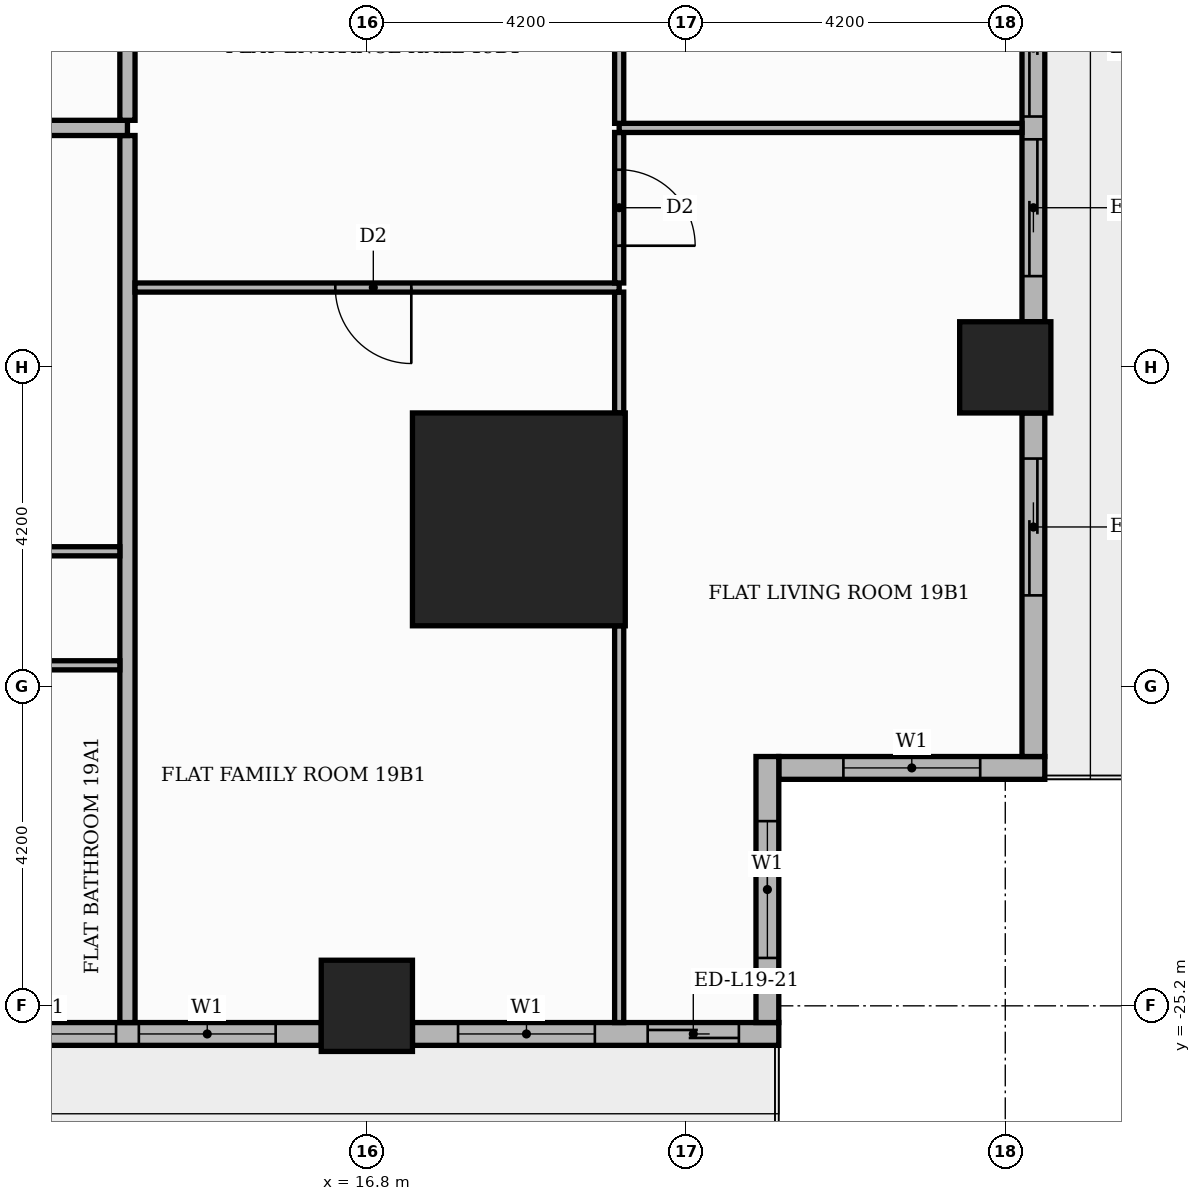
"""IFC4 building model, lengths in metres.
Left out: names, types, materials, properties, quantities, classifications, styles, units other than length and angle.
Written with IfcOpenShell. Run it as: python <this file> out.ifc"""

import sys

from ifc_helpers import new_model, si_unit, direction, frame, frame_2d, origin, origin_2d, place, context, subcontext, project, spatial, rectangle, extrude, element, fill, save


model = new_model("IFC4")
c1 = context("Model", 3, precision=1e-05, world=origin(), true_north=direction((0.0, 1.0)))
c2 = subcontext(c1, "Body", "Model", "MODEL_VIEW")
j1 = project(units=[si_unit("LENGTHUNIT", "METRE"), si_unit("PLANEANGLEUNIT", "RADIAN")], contexts=[c1])
p1 = place(None, origin())
s1 = spatial("IfcSite", under=j1, at=p1, CompositionType="ELEMENT")
p2 = place(p1, origin())
s2 = spatial("IfcBuilding", under=s1, at=p2, CompositionType="ELEMENT")
p3 = place(p2, frame((0.0, 0.0, 83.1)))
s3 = spatial("IfcBuildingStorey", under=s2, at=p3, CompositionType="ELEMENT", Elevation=83.1)
p4 = place(p3, frame((18.8, -18.8, 0.0), z_axis=(0.0, 0.0, 1.0), x_axis=(1.0, 0.0, 0.0)))
e1 = element("IfcColumn", 1, at=p4, inside=s3, PredefinedType="COLUMN", context=c2, shape_type="SweptSolid", body=[
    extrude(rectangle(XDim=2.8, YDim=2.8, at=origin_2d()), origin(), (0.0, 0.0, 1.0), 3.9),
])
for number, where, z_axis, x_axis in (
    (2, (25.2, -16.8, 0.0), (0.0, 0.0, 1.0), (1.0, 0.0, 0.0)),
    (3, (16.8, -25.2, 0.0), (0.0, 0.0, 1.0), (1.0, 0.0, 0.0)),
):
    element("IfcColumn", number, at=place(p3, frame(where, z_axis=z_axis, x_axis=x_axis)), inside=s3, PredefinedType="COLUMN", context=c2, shape_type="SweptSolid", body=[
        extrude(rectangle(XDim=1.2, YDim=1.2, at=origin_2d()), origin(), (0.0, 0.0, 1.0), 3.9),
    ])
p5 = place(p3, frame((22.22, -22.07, 0.0), z_axis=(0.0, 0.0, 1.0), x_axis=(1.0, 0.0, 0.0)))
e4 = element("IfcWall", 4, at=p5, inside=s3, PredefinedType="STANDARD", context=c2, shape_type="SweptSolid", body=[
    extrude(rectangle(XDim=3.5, YDim=0.3, at=frame_2d((1.75, 0.0))), origin(), (0.0, 0.0, 1.0), 3.48),
])
p6 = place(p5, frame((0.85, 0.0, 0.9)))
e5 = element("IfcOpeningElement", 5, at=p6, cuts=e4, PredefinedType="OPENING", context=c2, shape_type="SweptSolid", body=[
    extrude(rectangle(XDim=1.8, YDim=2.1, at=frame_2d((0.9, 1.05))), frame((0.0, 0.16, 0.0), z_axis=(0.0, -1.0, 0.0), x_axis=(1.0, 0.0, 0.0)), (0.0, 0.0, 1.0), 0.32),
])
p7 = place(p3, frame((25.57, -21.92, 0.0), z_axis=(0.0, 0.0, 1.0), x_axis=(0.0, 1.0, 0.0)))
e6 = element("IfcWall", 6, at=p7, inside=s3, PredefinedType="STANDARD", context=c2, shape_type="SweptSolid", body=[
    extrude(rectangle(XDim=4.52, YDim=0.3, at=frame_2d((2.26, 0.0))), origin(), (0.0, 0.0, 1.0), 3.48),
])
p8 = place(p7, frame((2.12, 0.0, 0.0)))
e7 = element("IfcOpeningElement", 7, at=p8, cuts=e6, PredefinedType="OPENING", context=c2, shape_type="SweptSolid", body=[
    extrude(rectangle(XDim=1.8, YDim=2.4, at=frame_2d((0.9, 1.2))), frame((0.0, 0.16, 0.0), z_axis=(0.0, -1.0, 0.0), x_axis=(1.0, 0.0, 0.0)), (0.0, 0.0, 1.0), 0.32),
])
p9 = place(p3, frame((25.57, -16.2, 0.0), z_axis=(0.0, 0.0, 1.0), x_axis=(0.0, 1.0, 0.0)))
e8 = element("IfcWall", 8, at=p9, inside=s3, PredefinedType="STANDARD", context=c2, shape_type="SweptSolid", body=[
    extrude(rectangle(XDim=7.2, YDim=0.3, at=frame_2d((3.6, 0.0))), origin(), (0.0, 0.0, 1.0), 3.48),
])
p10 = place(p9, frame((0.6, 0.0, 0.0)))
e9 = element("IfcOpeningElement", 9, at=p10, cuts=e8, PredefinedType="OPENING", context=c2, shape_type="SweptSolid", body=[
    extrude(rectangle(XDim=1.8, YDim=2.4, at=frame_2d((0.9, 1.2))), frame((0.0, 0.16, 0.0), z_axis=(0.0, -1.0, 0.0), x_axis=(1.0, 0.0, 0.0)), (0.0, 0.0, 1.0), 0.32),
])
p11 = place(p9, frame((2.7, 0.0, 0.0)))
e10 = element("IfcOpeningElement", 10, at=p11, cuts=e8, PredefinedType="OPENING", context=c2, shape_type="SweptSolid", body=[
    extrude(rectangle(XDim=1.8, YDim=2.4, at=frame_2d((0.9, 1.2))), frame((0.0, 0.16, 0.0), z_axis=(0.0, -1.0, 0.0), x_axis=(1.0, 0.0, 0.0)), (0.0, 0.0, 1.0), 0.32),
])
p12 = place(p9, frame((4.8, 0.0, 0.9)))
e11 = element("IfcOpeningElement", 11, at=p12, cuts=e8, PredefinedType="OPENING", context=c2, shape_type="SweptSolid", body=[
    extrude(rectangle(XDim=1.8, YDim=2.1, at=frame_2d((0.9, 1.05))), frame((0.0, 0.16, 0.0), z_axis=(0.0, -1.0, 0.0), x_axis=(1.0, 0.0, 0.0)), (0.0, 0.0, 1.0), 0.32),
])
p13 = place(p3, frame((9.0, -25.57, 0.0), z_axis=(0.0, 0.0, 1.0), x_axis=(1.0, 0.0, 0.0)))
e12 = element("IfcWall", 12, at=p13, inside=s3, PredefinedType="STANDARD", context=c2, shape_type="SweptSolid", body=[
    extrude(rectangle(XDim=7.2, YDim=0.3, at=frame_2d((3.6, 0.0))), origin(), (0.0, 0.0, 1.0), 3.48),
])
p14 = place(p13, frame((0.6, 0.0, 0.9)))
e13 = element("IfcOpeningElement", 13, at=p14, cuts=e12, PredefinedType="OPENING", context=c2, shape_type="SweptSolid", body=[
    extrude(rectangle(XDim=1.8, YDim=2.1, at=frame_2d((0.9, 1.05))), frame((0.0, 0.16, 0.0), z_axis=(0.0, -1.0, 0.0), x_axis=(1.0, 0.0, 0.0)), (0.0, 0.0, 1.0), 0.32),
])
p15 = place(p13, frame((2.7, 0.0, 0.9)))
e14 = element("IfcOpeningElement", 14, at=p15, cuts=e12, PredefinedType="OPENING", context=c2, shape_type="SweptSolid", body=[
    extrude(rectangle(XDim=1.8, YDim=2.1, at=frame_2d((0.9, 1.05))), frame((0.0, 0.16, 0.0), z_axis=(0.0, -1.0, 0.0), x_axis=(1.0, 0.0, 0.0)), (0.0, 0.0, 1.0), 0.32),
])
p16 = place(p13, frame((4.8, 0.0, 0.9)))
e15 = element("IfcOpeningElement", 15, at=p16, cuts=e12, PredefinedType="OPENING", context=c2, shape_type="SweptSolid", body=[
    extrude(rectangle(XDim=1.8, YDim=2.1, at=frame_2d((0.9, 1.05))), frame((0.0, 0.16, 0.0), z_axis=(0.0, -1.0, 0.0), x_axis=(1.0, 0.0, 0.0)), (0.0, 0.0, 1.0), 0.32),
])
p17 = place(p3, frame((17.4, -25.57, 0.0), z_axis=(0.0, 0.0, 1.0), x_axis=(1.0, 0.0, 0.0)))
e16 = element("IfcWall", 16, at=p17, inside=s3, PredefinedType="STANDARD", context=c2, shape_type="SweptSolid", body=[
    extrude(rectangle(XDim=4.82, YDim=0.3, at=frame_2d((2.41, 0.0))), origin(), (0.0, 0.0, 1.0), 3.48),
])
p18 = place(p17, frame((0.6, 0.0, 0.9)))
e17 = element("IfcOpeningElement", 17, at=p18, cuts=e16, PredefinedType="OPENING", context=c2, shape_type="SweptSolid", body=[
    extrude(rectangle(XDim=1.8, YDim=2.1, at=frame_2d((0.9, 1.05))), frame((0.0, 0.16, 0.0), z_axis=(0.0, -1.0, 0.0), x_axis=(1.0, 0.0, 0.0)), (0.0, 0.0, 1.0), 0.32),
])
p19 = place(p17, frame((3.095, 0.0, 0.0)))
e18 = element("IfcOpeningElement", 18, at=p19, cuts=e16, PredefinedType="OPENING", context=c2, shape_type="SweptSolid", body=[
    extrude(rectangle(XDim=1.2, YDim=2.4, at=frame_2d((0.6, 1.2))), frame((0.0, 0.16, 0.0), z_axis=(0.0, -1.0, 0.0), x_axis=(1.0, 0.0, 0.0)), (0.0, 0.0, 1.0), 0.32),
])
p20 = place(p3, frame((22.07, -25.42, 0.0), z_axis=(0.0, 0.0, 1.0), x_axis=(0.0, 1.0, 0.0)))
e19 = element("IfcWall", 19, at=p20, inside=s3, PredefinedType="STANDARD", context=c2, shape_type="SweptSolid", body=[
    extrude(rectangle(XDim=3.5, YDim=0.3, at=frame_2d((1.75, 0.0))), origin(), (0.0, 0.0, 1.0), 3.48),
])
p21 = place(p20, frame((0.85, 0.0, 0.9)))
e20 = element("IfcOpeningElement", 20, at=p21, cuts=e19, PredefinedType="OPENING", context=c2, shape_type="SweptSolid", body=[
    extrude(rectangle(XDim=1.8, YDim=2.1, at=frame_2d((0.9, 1.05))), frame((0.0, 0.16, 0.0), z_axis=(0.0, -1.0, 0.0), x_axis=(1.0, 0.0, 0.0)), (0.0, 0.0, 1.0), 0.32),
])
p22 = place(p3, frame((13.65, -25.42, 0.0), z_axis=(0.0, 0.0, 1.0), x_axis=(0.0, 1.0, 0.0)))
e21 = element("IfcWall", 21, at=p22, inside=s3, PredefinedType="PARTITIONING", context=c2, shape_type="SweptSolid", body=[
    extrude(rectangle(XDim=11.67, YDim=0.2, at=frame_2d((5.835, 0.0))), origin(), (0.0, 0.0, 1.0), 3.48),
])
p23 = place(p3, frame((20.12, -25.42, 0.0), z_axis=(0.0, 0.0, 1.0), x_axis=(0.0, 1.0, 0.0)))
e22 = element("IfcWall", 22, at=p23, inside=s3, PredefinedType="PARTITIONING", context=c2, shape_type="SweptSolid", body=[
    extrude(rectangle(XDim=5.22, YDim=0.12, at=frame_2d((2.61, 0.0))), origin(), (0.0, 0.0, 1.0), 3.48),
])
p24 = place(p3, frame((-25.42, -20.72, 0.0), z_axis=(0.0, 0.0, 1.0), x_axis=(1.0, 0.0, 0.0)))
e23 = element("IfcWall", 23, at=p24, inside=s3, PredefinedType="PARTITIONING", context=c2, shape_type="SweptSolid", body=[
    extrude(rectangle(XDim=38.97, YDim=0.12, at=frame_2d((19.485, 0.0))), origin(), (0.0, 0.0, 1.0), 3.48),
])
p25 = place(p24, frame((12.32, 0.0, 0.0)))
e24 = element("IfcOpeningElement", 24, at=p25, cuts=e23, PredefinedType="OPENING", context=c2, shape_type="SweptSolid", body=[
    extrude(rectangle(XDim=1.0, YDim=2.1, at=frame_2d((0.5, 1.05))), frame((0.0, 0.07, 0.0), z_axis=(0.0, -1.0, 0.0), x_axis=(1.0, 0.0, 0.0)), (0.0, 0.0, 1.0), 0.14),
])
p26 = place(p24, frame((15.52, 0.0, 0.0)))
e25 = element("IfcOpeningElement", 25, at=p26, cuts=e23, PredefinedType="OPENING", context=c2, shape_type="SweptSolid", body=[
    extrude(rectangle(XDim=0.9, YDim=2.1, at=frame_2d((0.45, 1.05))), frame((0.0, 0.07, 0.0), z_axis=(0.0, -1.0, 0.0), x_axis=(1.0, 0.0, 0.0)), (0.0, 0.0, 1.0), 0.14),
])
p27 = place(p24, frame((19.72, 0.0, 0.0)))
e26 = element("IfcOpeningElement", 26, at=p27, cuts=e23, PredefinedType="OPENING", context=c2, shape_type="SweptSolid", body=[
    extrude(rectangle(XDim=0.9, YDim=2.1, at=frame_2d((0.45, 1.05))), frame((0.0, 0.07, 0.0), z_axis=(0.0, -1.0, 0.0), x_axis=(1.0, 0.0, 0.0)), (0.0, 0.0, 1.0), 0.14),
])
p28 = place(p24, frame((28.12, 0.0, 0.0)))
e27 = element("IfcOpeningElement", 27, at=p28, cuts=e23, PredefinedType="OPENING", context=c2, shape_type="SweptSolid", body=[
    extrude(rectangle(XDim=0.9, YDim=2.1, at=frame_2d((0.45, 1.05))), frame((0.0, 0.07, 0.0), z_axis=(0.0, -1.0, 0.0), x_axis=(1.0, 0.0, 0.0)), (0.0, 0.0, 1.0), 0.14),
])
p29 = place(p24, frame((34.42, 0.0, 0.0)))
e28 = element("IfcOpeningElement", 28, at=p29, cuts=e23, PredefinedType="OPENING", context=c2, shape_type="SweptSolid", body=[
    extrude(rectangle(XDim=0.9, YDim=2.1, at=frame_2d((0.45, 1.05))), frame((0.0, 0.07, 0.0), z_axis=(0.0, -1.0, 0.0), x_axis=(1.0, 0.0, 0.0)), (0.0, 0.0, 1.0), 0.14),
])
p30 = place(p3, frame((-7.35, -19.22, 0.0), z_axis=(0.0, 0.0, 1.0), x_axis=(1.0, 0.0, 0.0)))
e29 = element("IfcWall", 29, at=p30, inside=s3, PredefinedType="PARTITIONING", context=c2, shape_type="SweptSolid", body=[
    extrude(rectangle(XDim=20.9, YDim=0.12, at=frame_2d((10.45, 0.0))), origin(), (0.0, 0.0, 1.0), 3.48),
])
p31 = place(p30, frame((2.7, 0.0, 0.0)))
e30 = element("IfcOpeningElement", 30, at=p31, cuts=e29, PredefinedType="OPENING", context=c2, shape_type="SweptSolid", body=[
    extrude(rectangle(XDim=0.9, YDim=2.1, at=frame_2d((0.45, 1.05))), frame((0.0, 0.07, 0.0), z_axis=(0.0, -1.0, 0.0), x_axis=(1.0, 0.0, 0.0)), (0.0, 0.0, 1.0), 0.14),
])
p32 = place(p30, frame((7.95, 0.0, 0.0)))
e31 = element("IfcOpeningElement", 31, at=p32, cuts=e29, PredefinedType="OPENING", context=c2, shape_type="SweptSolid", body=[
    extrude(rectangle(XDim=0.9, YDim=2.1, at=frame_2d((0.45, 1.05))), frame((0.0, 0.07, 0.0), z_axis=(0.0, -1.0, 0.0), x_axis=(1.0, 0.0, 0.0)), (0.0, 0.0, 1.0), 0.14),
])
p33 = place(p30, frame((11.175, 0.0, 0.0)))
e32 = element("IfcOpeningElement", 32, at=p33, cuts=e29, PredefinedType="OPENING", context=c2, shape_type="SweptSolid", body=[
    extrude(rectangle(XDim=0.9, YDim=2.1, at=frame_2d((0.45, 1.05))), frame((0.0, 0.07, 0.0), z_axis=(0.0, -1.0, 0.0), x_axis=(1.0, 0.0, 0.0)), (0.0, 0.0, 1.0), 0.14),
])
p34 = place(p30, frame((14.1, 0.0, 0.0)))
e33 = element("IfcOpeningElement", 33, at=p34, cuts=e29, PredefinedType="OPENING", context=c2, shape_type="SweptSolid", body=[
    extrude(rectangle(XDim=0.9, YDim=2.1, at=frame_2d((0.45, 1.05))), frame((0.0, 0.07, 0.0), z_axis=(0.0, -1.0, 0.0), x_axis=(1.0, 0.0, 0.0)), (0.0, 0.0, 1.0), 0.14),
])
p35 = place(p30, frame((18.225, 0.0, 0.0)))
e34 = element("IfcOpeningElement", 34, at=p35, cuts=e29, PredefinedType="OPENING", context=c2, shape_type="SweptSolid", body=[
    extrude(rectangle(XDim=0.9, YDim=2.1, at=frame_2d((0.45, 1.05))), frame((0.0, 0.07, 0.0), z_axis=(0.0, -1.0, 0.0), x_axis=(1.0, 0.0, 0.0)), (0.0, 0.0, 1.0), 0.14),
])
p36 = place(p3, frame((20.12, -17.4, 0.0), z_axis=(0.0, 0.0, 1.0), x_axis=(0.0, 1.0, 0.0)))
e35 = element("IfcWall", 35, at=p36, inside=s3, PredefinedType="PARTITIONING", context=c2, shape_type="SweptSolid", body=[
    extrude(rectangle(XDim=1.59, YDim=0.12, at=frame_2d((0.795, 0.0))), origin(), (0.0, 0.0, 1.0), 3.48),
])
p37 = place(p3, frame((13.75, -15.75, 0.0), z_axis=(0.0, 0.0, 1.0), x_axis=(1.0, 0.0, 0.0)))
e36 = element("IfcWall", 36, at=p37, inside=s3, PredefinedType="PARTITIONING", context=c2, shape_type="SweptSolid", body=[
    extrude(rectangle(XDim=6.37, YDim=0.12, at=frame_2d((3.185, 0.0))), origin(), (0.0, 0.0, 1.0), 3.48),
])
p38 = place(p37, frame((2.635, 0.0, 0.0)))
e37 = element("IfcOpeningElement", 37, at=p38, cuts=e36, PredefinedType="OPENING", context=c2, shape_type="SweptSolid", body=[
    extrude(rectangle(XDim=1.0, YDim=2.1, at=frame_2d((0.5, 1.05))), frame((0.0, 0.07, 0.0), z_axis=(0.0, -1.0, 0.0), x_axis=(1.0, 0.0, 0.0)), (0.0, 0.0, 1.0), 0.14),
])
p39 = place(p3, frame((20.12, -15.69, 0.0), z_axis=(0.0, 0.0, 1.0), x_axis=(0.0, 1.0, 0.0)))
e38 = element("IfcWall", 38, at=p39, inside=s3, PredefinedType="PARTITIONING", context=c2, shape_type="SweptSolid", body=[
    extrude(rectangle(XDim=1.98, YDim=0.12, at=frame_2d((0.99, 0.0))), origin(), (0.0, 0.0, 1.0), 3.48),
])
p40 = place(p39, frame((0.49, 0.0, 0.0)))
e39 = element("IfcOpeningElement", 39, at=p40, cuts=e38, PredefinedType="OPENING", context=c2, shape_type="SweptSolid", body=[
    extrude(rectangle(XDim=1.0, YDim=2.1, at=frame_2d((0.5, 1.05))), frame((0.0, 0.07, 0.0), z_axis=(0.0, -1.0, 0.0), x_axis=(1.0, 0.0, 0.0)), (0.0, 0.0, 1.0), 0.14),
])
p41 = place(p3, frame((-25.42, -13.65, 0.0), z_axis=(0.0, 0.0, 1.0), x_axis=(1.0, 0.0, 0.0)))
e40 = element("IfcWall", 40, at=p41, inside=s3, PredefinedType="PARTITIONING", context=c2, shape_type="SweptSolid", body=[
    extrude(rectangle(XDim=39.07, YDim=0.2, at=frame_2d((19.535, 0.0))), origin(), (0.0, 0.0, 1.0), 3.48),
])
p42 = place(p41, frame((14.37, 0.0, 0.0)))
e41 = element("IfcOpeningElement", 41, at=p42, cuts=e40, PredefinedType="OPENING", context=c2, shape_type="SweptSolid", body=[
    extrude(rectangle(XDim=1.1, YDim=2.4, at=frame_2d((0.55, 1.2))), frame((0.0, 0.11, 0.0), z_axis=(0.0, -1.0, 0.0), x_axis=(1.0, 0.0, 0.0)), (0.0, 0.0, 1.0), 0.22),
])
p43 = place(p3, frame((20.12, -13.65, 0.0), z_axis=(0.0, 0.0, 1.0), x_axis=(1.0, 0.0, 0.0)))
e42 = element("IfcWall", 42, at=p43, inside=s3, PredefinedType="PARTITIONING", context=c2, shape_type="SweptSolid", body=[
    extrude(rectangle(XDim=5.3, YDim=0.12, at=frame_2d((2.65, 0.0))), origin(), (0.0, 0.0, 1.0), 3.48),
])
p44 = place(p3, frame((20.12, -13.59, 0.0), z_axis=(0.0, 0.0, 1.0), x_axis=(0.0, 1.0, 0.0)))
e43 = element("IfcWall", 43, at=p44, inside=s3, PredefinedType="PARTITIONING", context=c2, shape_type="SweptSolid", body=[
    extrude(rectangle(XDim=4.08, YDim=0.12, at=frame_2d((2.04, 0.0))), origin(), (0.0, 0.0, 1.0), 3.48),
])
p45 = place(p44, frame((1.59, 0.0, 0.0)))
e44 = element("IfcOpeningElement", 44, at=p45, cuts=e43, PredefinedType="OPENING", context=c2, shape_type="SweptSolid", body=[
    extrude(rectangle(XDim=0.9, YDim=2.1, at=frame_2d((0.45, 1.05))), frame((0.0, 0.07, 0.0), z_axis=(0.0, -1.0, 0.0), x_axis=(1.0, 0.0, 0.0)), (0.0, 0.0, 1.0), 0.14),
])
p46 = place(p3, frame((13.65, -13.55, 0.0), z_axis=(0.0, 0.0, 1.0), x_axis=(0.0, 1.0, 0.0)))
e45 = element("IfcWall", 45, at=p46, inside=s3, PredefinedType="PARTITIONING", context=c2, shape_type="SweptSolid", body=[
    extrude(rectangle(XDim=8.2, YDim=0.2, at=frame_2d((4.1, 0.0))), origin(), (0.0, 0.0, 1.0), 3.48),
])
p47 = place(p46, frame((1.45, 0.0, 0.0)))
e46 = element("IfcOpeningElement", 46, at=p47, cuts=e45, PredefinedType="OPENING", context=c2, shape_type="SweptSolid", body=[
    extrude(rectangle(XDim=1.1, YDim=2.4, at=frame_2d((0.55, 1.2))), frame((0.0, 0.11, 0.0), z_axis=(0.0, -1.0, 0.0), x_axis=(1.0, 0.0, 0.0)), (0.0, 0.0, 1.0), 0.22),
])
p48 = place(p6, origin())
e47 = element("IfcWindow", 47, at=p48, inside=s3, PartitioningType="SINGLE_PANEL", PredefinedType="WINDOW", context=c2, shape_type="SweptSolid", body=[
    extrude(rectangle(XDim=1.8, YDim=2.1, at=frame_2d((0.9, 1.05))), frame((0.0, 0.03, 0.0), z_axis=(0.0, -1.0, 0.0), x_axis=(1.0, 0.0, 0.0)), (0.0, 0.0, 1.0), 0.06),
])
fill(e5, e47)
p49 = place(p8, origin())
e48 = element("IfcDoor", 48, at=p49, inside=s3, OperationType="SLIDING_TO_RIGHT", PredefinedType="DOOR", context=c2, shape_type="SweptSolid", body=[
    extrude(rectangle(XDim=1.8, YDim=2.4, at=frame_2d((0.9, 1.2))), frame((0.0, 0.025, 0.0), z_axis=(0.0, -1.0, 0.0), x_axis=(1.0, 0.0, 0.0)), (0.0, 0.0, 1.0), 0.05),
])
fill(e7, e48)
p50 = place(p10, origin())
e49 = element("IfcDoor", 49, at=p50, inside=s3, OperationType="SLIDING_TO_LEFT", PredefinedType="DOOR", context=c2, shape_type="SweptSolid", body=[
    extrude(rectangle(XDim=1.8, YDim=2.4, at=frame_2d((0.9, 1.2))), frame((0.0, 0.025, 0.0), z_axis=(0.0, -1.0, 0.0), x_axis=(1.0, 0.0, 0.0)), (0.0, 0.0, 1.0), 0.05),
])
fill(e9, e49)
p51 = place(p11, origin())
e50 = element("IfcDoor", 50, at=p51, inside=s3, OperationType="SLIDING_TO_RIGHT", PredefinedType="DOOR", context=c2, shape_type="SweptSolid", body=[
    extrude(rectangle(XDim=1.8, YDim=2.4, at=frame_2d((0.9, 1.2))), frame((0.0, 0.025, 0.0), z_axis=(0.0, -1.0, 0.0), x_axis=(1.0, 0.0, 0.0)), (0.0, 0.0, 1.0), 0.05),
])
fill(e10, e50)
p52 = place(p15, origin())
e51 = element("IfcWindow", 51, at=p52, inside=s3, PartitioningType="SINGLE_PANEL", PredefinedType="WINDOW", context=c2, shape_type="SweptSolid", body=[
    extrude(rectangle(XDim=1.8, YDim=2.1, at=frame_2d((0.9, 1.05))), frame((0.0, 0.03, 0.0), z_axis=(0.0, -1.0, 0.0), x_axis=(1.0, 0.0, 0.0)), (0.0, 0.0, 1.0), 0.06),
])
fill(e14, e51)
p53 = place(p16, origin())
e52 = element("IfcWindow", 52, at=p53, inside=s3, PartitioningType="SINGLE_PANEL", PredefinedType="WINDOW", context=c2, shape_type="SweptSolid", body=[
    extrude(rectangle(XDim=1.8, YDim=2.1, at=frame_2d((0.9, 1.05))), frame((0.0, 0.03, 0.0), z_axis=(0.0, -1.0, 0.0), x_axis=(1.0, 0.0, 0.0)), (0.0, 0.0, 1.0), 0.06),
])
fill(e15, e52)
p54 = place(p18, origin())
e53 = element("IfcWindow", 53, at=p54, inside=s3, PartitioningType="SINGLE_PANEL", PredefinedType="WINDOW", context=c2, shape_type="SweptSolid", body=[
    extrude(rectangle(XDim=1.8, YDim=2.1, at=frame_2d((0.9, 1.05))), frame((0.0, 0.03, 0.0), z_axis=(0.0, -1.0, 0.0), x_axis=(1.0, 0.0, 0.0)), (0.0, 0.0, 1.0), 0.06),
])
fill(e17, e53)
p55 = place(p19, origin())
e54 = element("IfcDoor", 54, at=p55, inside=s3, OperationType="SLIDING_TO_RIGHT", PredefinedType="DOOR", context=c2, shape_type="SweptSolid", body=[
    extrude(rectangle(XDim=1.2, YDim=2.4, at=frame_2d((0.6, 1.2))), frame((0.0, 0.025, 0.0), z_axis=(0.0, -1.0, 0.0), x_axis=(1.0, 0.0, 0.0)), (0.0, 0.0, 1.0), 0.05),
])
fill(e18, e54)
p56 = place(p21, origin())
e55 = element("IfcWindow", 55, at=p56, inside=s3, PartitioningType="SINGLE_PANEL", PredefinedType="WINDOW", context=c2, shape_type="SweptSolid", body=[
    extrude(rectangle(XDim=1.8, YDim=2.1, at=frame_2d((0.9, 1.05))), frame((0.0, 0.03, 0.0), z_axis=(0.0, -1.0, 0.0), x_axis=(1.0, 0.0, 0.0)), (0.0, 0.0, 1.0), 0.06),
])
fill(e20, e55)
p57 = place(p38, frame((1.0, 0.0, 0.0), z_axis=(0.0, 0.0, 1.0), x_axis=(-1.0, 0.0, 0.0)))
e56 = element("IfcDoor", 56, at=p57, inside=s3, OperationType="SINGLE_SWING_RIGHT", PredefinedType="DOOR", context=c2, shape_type="SweptSolid", body=[
    extrude(rectangle(XDim=1.0, YDim=2.1, at=frame_2d((0.5, 1.05))), frame((0.0, 0.025, 0.0), z_axis=(0.0, -1.0, 0.0), x_axis=(1.0, 0.0, 0.0)), (0.0, 0.0, 1.0), 0.05),
])
fill(e37, e56)
p58 = place(p40, frame((1.0, 0.0, 0.0), z_axis=(0.0, 0.0, 1.0), x_axis=(-1.0, 0.0, 0.0)))
e57 = element("IfcDoor", 57, at=p58, inside=s3, OperationType="SINGLE_SWING_LEFT", PredefinedType="DOOR", context=c2, shape_type="SweptSolid", body=[
    extrude(rectangle(XDim=1.0, YDim=2.1, at=frame_2d((0.5, 1.05))), frame((0.0, 0.025, 0.0), z_axis=(0.0, -1.0, 0.0), x_axis=(1.0, 0.0, 0.0)), (0.0, 0.0, 1.0), 0.05),
])
fill(e39, e57)
save(model, sys.argv[1])
